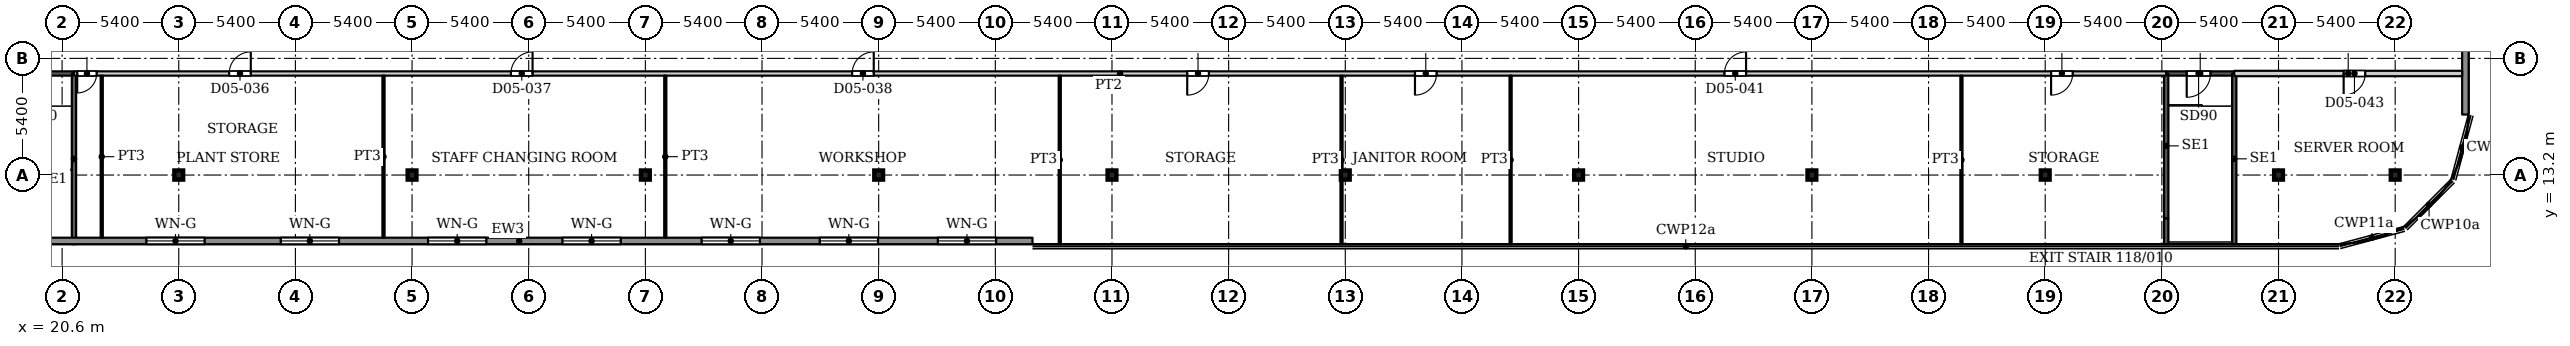
"""IFC4 building model, lengths in metres.
Left out: names, types, materials, properties, quantities, classifications, styles, units other than length and angle.
Written with IfcOpenShell. Run it as: python <this file> out.ifc"""

import sys

from ifc_helpers import new_model, si_unit, direction, frame, frame_2d, origin, origin_2d, place, context, subcontext, project, spatial, rectangle, i_section, extrude, source, transform, mapped, element, fill, save


model = new_model("IFC4")
c1 = context("Model", 3, precision=1e-05, world=origin(), true_north=direction((0.0, 1.0)))
c2 = subcontext(c1, "Body", "Model", "MODEL_VIEW")
j1 = project(units=[si_unit("LENGTHUNIT", "METRE"), si_unit("PLANEANGLEUNIT", "RADIAN")], contexts=[c1])
p1 = place(None, origin())
s1 = spatial("IfcSite", under=j1, at=p1, CompositionType="ELEMENT")
p2 = place(p1, origin())
s2 = spatial("IfcBuilding", under=s1, at=p2, CompositionType="ELEMENT")
p3 = place(p2, frame((0.0, 0.0, 26.0)))
s3 = spatial("IfcBuildingStorey", under=s2, at=p3, CompositionType="ELEMENT", Elevation=26.0)
for number, where, z_axis, x_axis in (
    (1, (26.0, 13.2, 0.0), (0.0, 0.0, 1.0), (1.0, 0.0, 0.0)),
    (2, (36.8, 13.2, 0.0), (0.0, 0.0, 1.0), (1.0, 0.0, 0.0)),
    (3, (47.6, 13.2, 0.0), (0.0, 0.0, 1.0), (1.0, 0.0, 0.0)),
    (4, (58.4, 13.2, 0.0), (0.0, 0.0, 1.0), (1.0, 0.0, 0.0)),
    (5, (69.2, 13.2, 0.0), (0.0, 0.0, 1.0), (1.0, 0.0, 0.0)),
    (6, (80.0, 13.2, 0.0), (0.0, 0.0, 1.0), (1.0, 0.0, 0.0)),
    (7, (90.8, 13.2, 0.0), (0.0, 0.0, 1.0), (1.0, 0.0, 0.0)),
    (8, (101.6, 13.2, 0.0), (0.0, 0.0, 1.0), (1.0, 0.0, 0.0)),
    (9, (112.4, 13.2, 0.0), (0.0, 0.0, 1.0), (1.0, 0.0, 0.0)),
    (10, (123.2, 13.2, 0.0), (0.0, 0.0, 1.0), (1.0, 0.0, 0.0)),
    (11, (128.6, 13.2, 0.0), (0.0, 0.0, 1.0), (1.0, 0.0, 0.0)),
):
    element("IfcColumn", number, at=place(p3, frame(where, z_axis=z_axis, x_axis=x_axis)), inside=s3, PredefinedType="COLUMN", context=c2, shape_type="SweptSolid", body=[
        extrude(i_section(OverallWidth=0.409, OverallDepth=0.425, WebThickness=0.033, FlangeThickness=0.052, FilletRadius=0.013, at=origin_2d()), origin(), (0.0, 0.0, 1.0), 4.5),
    ])
p4 = place(p3, frame((131.85, 54.72, 0.0), z_axis=(0.0, 0.0, 1.0), x_axis=(0.0, -1.0, 0.0)))
e12 = element("IfcWall", 12, at=p4, inside=s3, PredefinedType="SOLIDWALL", context=c2, shape_type="SweptSolid", body=[
    extrude(rectangle(XDim=38.72, YDim=0.3, at=frame_2d((19.36, 0.0))), origin(), (0.0, 0.0, 1.0), 4.25),
])
p5 = place(p4, frame((2.435, 0.0, 2.4)))
e13 = element("IfcOpeningElement", 13, at=p5, cuts=e12, PredefinedType="OPENING", context=c2, shape_type="SweptSolid", body=[
    extrude(rectangle(XDim=2.7, YDim=1.2, at=frame_2d((1.35, 0.6))), frame((0.0, 0.16, 0.0), z_axis=(0.0, -1.0, 0.0), x_axis=(1.0, 0.0, 0.0)), (0.0, 0.0, 1.0), 0.32),
])
p6 = place(p4, frame((13.58, 0.0, 2.4)))
e14 = element("IfcOpeningElement", 14, at=p6, cuts=e12, PredefinedType="OPENING", context=c2, shape_type="SweptSolid", body=[
    extrude(rectangle(XDim=2.7, YDim=1.2, at=frame_2d((1.35, 0.6))), frame((0.0, 0.16, 0.0), z_axis=(0.0, -1.0, 0.0), x_axis=(1.0, 0.0, 0.0)), (0.0, 0.0, 1.0), 0.32),
])
p7 = place(p4, frame((26.16, 0.0, 2.4)))
e15 = element("IfcOpeningElement", 15, at=p7, cuts=e12, PredefinedType="OPENING", context=c2, shape_type="SweptSolid", body=[
    extrude(rectangle(XDim=2.7, YDim=1.2, at=frame_2d((1.35, 0.6))), frame((0.0, 0.16, 0.0), z_axis=(0.0, -1.0, 0.0), x_axis=(1.0, 0.0, 0.0)), (0.0, 0.0, 1.0), 0.32),
])
p8 = place(p3, frame((65.52, 10.15, 0.0), z_axis=(0.0, 0.0, 1.0), x_axis=(-1.0, 0.0, 0.0)))
e16 = element("IfcWall", 16, at=p8, inside=s3, PredefinedType="SOLIDWALL", context=c2, shape_type="SweptSolid", body=[
    extrude(rectangle(XDim=47.52, YDim=0.3, at=frame_2d((23.76, 0.0))), origin(), (0.0, 0.0, 1.0), 4.25),
])
p9 = place(p8, frame((1.683, 0.0, 2.4)))
e17 = element("IfcOpeningElement", 17, at=p9, cuts=e16, PredefinedType="OPENING", context=c2, shape_type="SweptSolid", body=[
    extrude(rectangle(XDim=2.7, YDim=1.2, at=frame_2d((1.35, 0.6))), frame((0.0, 0.16, 0.0), z_axis=(0.0, -1.0, 0.0), x_axis=(1.0, 0.0, 0.0)), (0.0, 0.0, 1.0), 0.32),
])
p10 = place(p8, frame((7.15, 0.0, 2.4)))
e18 = element("IfcOpeningElement", 18, at=p10, cuts=e16, PredefinedType="OPENING", context=c2, shape_type="SweptSolid", body=[
    extrude(rectangle(XDim=2.7, YDim=1.2, at=frame_2d((1.35, 0.6))), frame((0.0, 0.16, 0.0), z_axis=(0.0, -1.0, 0.0), x_axis=(1.0, 0.0, 0.0)), (0.0, 0.0, 1.0), 0.32),
])
p11 = place(p8, frame((12.617, 0.0, 2.4)))
e19 = element("IfcOpeningElement", 19, at=p11, cuts=e16, PredefinedType="OPENING", context=c2, shape_type="SweptSolid", body=[
    extrude(rectangle(XDim=2.7, YDim=1.2, at=frame_2d((1.35, 0.6))), frame((0.0, 0.16, 0.0), z_axis=(0.0, -1.0, 0.0), x_axis=(1.0, 0.0, 0.0)), (0.0, 0.0, 1.0), 0.32),
])
p12 = place(p8, frame((19.06, 0.0, 2.4)))
e20 = element("IfcOpeningElement", 20, at=p12, cuts=e16, PredefinedType="OPENING", context=c2, shape_type="SweptSolid", body=[
    extrude(rectangle(XDim=2.7, YDim=1.2, at=frame_2d((1.35, 0.6))), frame((0.0, 0.16, 0.0), z_axis=(0.0, -1.0, 0.0), x_axis=(1.0, 0.0, 0.0)), (0.0, 0.0, 1.0), 0.32),
])
p13 = place(p8, frame((25.28, 0.0, 2.4)))
e21 = element("IfcOpeningElement", 21, at=p13, cuts=e16, PredefinedType="OPENING", context=c2, shape_type="SweptSolid", body=[
    extrude(rectangle(XDim=2.7, YDim=1.2, at=frame_2d((1.35, 0.6))), frame((0.0, 0.16, 0.0), z_axis=(0.0, -1.0, 0.0), x_axis=(1.0, 0.0, 0.0)), (0.0, 0.0, 1.0), 0.32),
])
p14 = place(p8, frame((32.1, 0.0, 2.4)))
e22 = element("IfcOpeningElement", 22, at=p14, cuts=e16, PredefinedType="OPENING", context=c2, shape_type="SweptSolid", body=[
    extrude(rectangle(XDim=2.7, YDim=1.2, at=frame_2d((1.35, 0.6))), frame((0.0, 0.16, 0.0), z_axis=(0.0, -1.0, 0.0), x_axis=(1.0, 0.0, 0.0)), (0.0, 0.0, 1.0), 0.32),
])
p15 = place(p8, frame((38.32, 0.0, 2.4)))
e23 = element("IfcOpeningElement", 23, at=p15, cuts=e16, PredefinedType="OPENING", context=c2, shape_type="SweptSolid", body=[
    extrude(rectangle(XDim=2.7, YDim=1.2, at=frame_2d((1.35, 0.6))), frame((0.0, 0.16, 0.0), z_axis=(0.0, -1.0, 0.0), x_axis=(1.0, 0.0, 0.0)), (0.0, 0.0, 1.0), 0.32),
])
p16 = place(p3, frame((18.0, 17.9, 0.0), z_axis=(0.0, 0.0, 1.0), x_axis=(1.0, 0.0, 0.0)))
e24 = element("IfcWall", 24, at=p16, inside=s3, PredefinedType="SHEAR", context=c2, shape_type="SweptSolid", body=[
    extrude(rectangle(XDim=3.15, YDim=0.2, at=frame_2d((1.575, 0.0))), origin(), (0.0, 0.0, 1.0), 4.5),
])
p17 = place(p16, frame((0.95, 0.0, 0.0)))
e25 = element("IfcOpeningElement", 25, at=p17, cuts=e24, PredefinedType="OPENING", context=c2, shape_type="SweptSolid", body=[
    extrude(rectangle(XDim=1.1, YDim=2.2, at=frame_2d((0.55, 1.1))), frame((0.0, 0.11, 0.0), z_axis=(0.0, -1.0, 0.0), x_axis=(1.0, 0.0, 0.0)), (0.0, 0.0, 1.0), 0.22),
])
p18 = place(p3, frame((21.15, 10.0, 0.0), z_axis=(0.0, 0.0, 1.0), x_axis=(0.0, 1.0, 0.0)))
e26 = element("IfcWall", 26, at=p18, inside=s3, PredefinedType="SHEAR", context=c2, shape_type="SweptSolid", body=[
    extrude(rectangle(XDim=7.9, YDim=0.2, at=frame_2d((3.95, 0.0))), origin(), (0.0, 0.0, 1.0), 4.5),
])
p19 = place(p3, frame((118.0, 17.9, 0.0), z_axis=(0.0, 0.0, 1.0), x_axis=(1.0, 0.0, 0.0)))
e27 = element("IfcWall", 27, at=p19, inside=s3, PredefinedType="SHEAR", context=c2, shape_type="SweptSolid", body=[
    extrude(rectangle(XDim=3.15, YDim=0.2, at=frame_2d((1.575, 0.0))), origin(), (0.0, 0.0, 1.0), 4.5),
])
p20 = place(p19, frame((0.95, 0.0, 0.0)))
e28 = element("IfcOpeningElement", 28, at=p20, cuts=e27, PredefinedType="OPENING", context=c2, shape_type="SweptSolid", body=[
    extrude(rectangle(XDim=1.1, YDim=2.2, at=frame_2d((0.55, 1.1))), frame((0.0, 0.11, 0.0), z_axis=(0.0, -1.0, 0.0), x_axis=(1.0, 0.0, 0.0)), (0.0, 0.0, 1.0), 0.22),
])
p21 = place(p3, frame((118.0, 10.0, 0.0), z_axis=(0.0, 0.0, 1.0), x_axis=(0.0, 1.0, 0.0)))
e29 = element("IfcWall", 29, at=p21, inside=s3, PredefinedType="SHEAR", context=c2, shape_type="SweptSolid", body=[
    extrude(rectangle(XDim=1.2, YDim=0.2, at=frame_2d((0.6, 0.0))), origin(), (0.0, 0.0, 1.0), 4.5),
])
p22 = place(p3, frame((118.0, 11.2, 0.0), z_axis=(0.0, 0.0, 1.0), x_axis=(0.0, 1.0, 0.0)))
e30 = element("IfcWall", 30, at=p22, inside=s3, PredefinedType="SHEAR", context=c2, shape_type="SweptSolid", body=[
    extrude(rectangle(XDim=6.7, YDim=0.2, at=frame_2d((3.35, 0.0))), origin(), (0.0, 0.0, 1.0), 4.5),
])
p23 = place(p3, frame((121.15, 10.0, 0.0), z_axis=(0.0, 0.0, 1.0), x_axis=(0.0, 1.0, 0.0)))
e31 = element("IfcWall", 31, at=p23, inside=s3, PredefinedType="SHEAR", context=c2, shape_type="SweptSolid", body=[
    extrude(rectangle(XDim=7.9, YDim=0.2, at=frame_2d((3.95, 0.0))), origin(), (0.0, 0.0, 1.0), 4.5),
])
p24 = place(p3, frame((21.15, 17.9, 0.0), z_axis=(0.0, 0.0, 1.0), x_axis=(1.0, 0.0, 0.0)))
e32 = element("IfcWall", 32, at=p24, inside=s3, PredefinedType="PARTITIONING", context=c2, shape_type="SweptSolid", body=[
    extrude(rectangle(XDim=96.85, YDim=0.2, at=frame_2d((48.425, 0.0))), origin(), (0.0, 0.0, 1.0), 4.2),
])
p25 = place(p24, frame((0.15, 0.0, 0.0)))
e33 = element("IfcOpeningElement", 33, at=p25, cuts=e32, PredefinedType="OPENING", context=c2, shape_type="SweptSolid", body=[
    extrude(rectangle(XDim=0.9, YDim=2.1, at=frame_2d((0.45, 1.05))), frame((0.0, 0.11, 0.0), z_axis=(0.0, -1.0, 0.0), x_axis=(1.0, 0.0, 0.0)), (0.0, 0.0, 1.0), 0.22),
])
p26 = place(p24, frame((7.185, 0.0, 0.0)))
e34 = element("IfcOpeningElement", 34, at=p26, cuts=e32, PredefinedType="OPENING", context=c2, shape_type="SweptSolid", body=[
    extrude(rectangle(XDim=1.0, YDim=2.1, at=frame_2d((0.5, 1.05))), frame((0.0, 0.11, 0.0), z_axis=(0.0, -1.0, 0.0), x_axis=(1.0, 0.0, 0.0)), (0.0, 0.0, 1.0), 0.22),
])
p27 = place(p24, frame((20.228, 0.0, 0.0)))
e35 = element("IfcOpeningElement", 35, at=p27, cuts=e32, PredefinedType="OPENING", context=c2, shape_type="SweptSolid", body=[
    extrude(rectangle(XDim=1.0, YDim=2.1, at=frame_2d((0.5, 1.05))), frame((0.0, 0.11, 0.0), z_axis=(0.0, -1.0, 0.0), x_axis=(1.0, 0.0, 0.0)), (0.0, 0.0, 1.0), 0.22),
])
p28 = place(p24, frame((36.022, 0.0, 0.0)))
e36 = element("IfcOpeningElement", 36, at=p28, cuts=e32, PredefinedType="OPENING", context=c2, shape_type="SweptSolid", body=[
    extrude(rectangle(XDim=1.0, YDim=2.1, at=frame_2d((0.5, 1.05))), frame((0.0, 0.11, 0.0), z_axis=(0.0, -1.0, 0.0), x_axis=(1.0, 0.0, 0.0)), (0.0, 0.0, 1.0), 0.22),
])
p29 = place(p24, frame((51.533, 0.0, 0.0)))
e37 = element("IfcOpeningElement", 37, at=p29, cuts=e32, PredefinedType="OPENING", context=c2, shape_type="SweptSolid", body=[
    extrude(rectangle(XDim=1.0, YDim=2.1, at=frame_2d((0.5, 1.05))), frame((0.0, 0.11, 0.0), z_axis=(0.0, -1.0, 0.0), x_axis=(1.0, 0.0, 0.0)), (0.0, 0.0, 1.0), 0.22),
])
p30 = place(p24, frame((62.076, 0.0, 0.0)))
e38 = element("IfcOpeningElement", 38, at=p30, cuts=e32, PredefinedType="OPENING", context=c2, shape_type="SweptSolid", body=[
    extrude(rectangle(XDim=1.0, YDim=2.1, at=frame_2d((0.5, 1.05))), frame((0.0, 0.11, 0.0), z_axis=(0.0, -1.0, 0.0), x_axis=(1.0, 0.0, 0.0)), (0.0, 0.0, 1.0), 0.22),
])
p31 = place(p24, frame((76.402, 0.0, 0.0)))
e39 = element("IfcOpeningElement", 39, at=p31, cuts=e32, PredefinedType="OPENING", context=c2, shape_type="SweptSolid", body=[
    extrude(rectangle(XDim=1.0, YDim=2.1, at=frame_2d((0.5, 1.05))), frame((0.0, 0.11, 0.0), z_axis=(0.0, -1.0, 0.0), x_axis=(1.0, 0.0, 0.0)), (0.0, 0.0, 1.0), 0.22),
])
p32 = place(p24, frame((91.522, 0.0, 0.0)))
e40 = element("IfcOpeningElement", 40, at=p32, cuts=e32, PredefinedType="OPENING", context=c2, shape_type="SweptSolid", body=[
    extrude(rectangle(XDim=1.0, YDim=2.1, at=frame_2d((0.5, 1.05))), frame((0.0, 0.11, 0.0), z_axis=(0.0, -1.0, 0.0), x_axis=(1.0, 0.0, 0.0)), (0.0, 0.0, 1.0), 0.22),
])
for number, where, z_axis, x_axis in (
    (41, (22.435, 10.299, 0.0), (0.0, 0.0, 1.0), (0.0, 1.0, 0.0)),
    (42, (35.478, 10.299, 0.0), (0.0, 0.0, 1.0), (0.0, 1.0, 0.0)),
    (43, (48.522, 10.299, 0.0), (0.0, 0.0, 1.0), (0.0, 1.0, 0.0)),
):
    element("IfcWall", number, at=place(p3, frame(where, z_axis=z_axis, x_axis=x_axis)), inside=s3, PredefinedType="PARTITIONING", context=c2, shape_type="SweptSolid", body=[
        extrude(rectangle(XDim=7.501, YDim=0.1, at=frame_2d((3.75, 0.0))), origin(), (0.0, 0.0, 1.0), 4.2),
    ])
for number, where, z_axis, x_axis in (
    (44, (66.783, 10.0, 0.0), (0.0, 0.0, 1.0), (0.0, 1.0, 0.0)),
    (45, (79.826, 10.0, 0.0), (0.0, 0.0, 1.0), (0.0, 1.0, 0.0)),
    (46, (87.652, 10.0, 0.0), (0.0, 0.0, 1.0), (0.0, 1.0, 0.0)),
    (47, (108.522, 10.0, 0.0), (0.0, 0.0, 1.0), (0.0, 1.0, 0.0)),
):
    element("IfcWall", number, at=place(p3, frame(where, z_axis=z_axis, x_axis=x_axis)), inside=s3, PredefinedType="PARTITIONING", context=c2, shape_type="SweptSolid", body=[
        extrude(rectangle(XDim=7.8, YDim=0.1, at=frame_2d((3.9, 0.0))), origin(), (0.0, 0.0, 1.0), 4.2),
    ])
p33 = place(p3, frame((121.15, 17.9, 0.0), z_axis=(0.0, 0.0, 1.0), x_axis=(1.0, 0.0, 0.0)))
e48 = element("IfcWall", 48, at=p33, inside=s3, PredefinedType="PARTITIONING", context=c2, shape_type="SweptSolid", body=[
    extrude(rectangle(XDim=10.551, YDim=0.25, at=frame_2d((5.275, 0.0))), origin(), (0.0, 0.0, 1.0), 4.2),
])
p34 = place(p33, frame((5.065, 0.0, 0.0)))
e49 = element("IfcOpeningElement", 49, at=p34, cuts=e48, PredefinedType="OPENING", context=c2, shape_type="SweptSolid", body=[
    extrude(rectangle(XDim=1.0, YDim=2.1, at=frame_2d((0.5, 1.05))), frame((0.0, 0.135, 0.0), z_axis=(0.0, -1.0, 0.0), x_axis=(1.0, 0.0, 0.0)), (0.0, 0.0, 1.0), 0.27),
])
m1 = source(origin(), c2, "Body", "SweptSolid", [
    extrude(rectangle(XDim=2.7, YDim=1.2, at=frame_2d((1.35, 0.6))), frame((0.0, 0.03, 0.0), z_axis=(0.0, -1.0, 0.0), x_axis=(1.0, 0.0, 0.0)), (0.0, 0.0, 1.0), 0.06),
])
p35 = place(p9, origin())
e50 = element("IfcWindow", 50, at=p35, inside=s3, PartitioningType="SINGLE_PANEL", PredefinedType="WINDOW", context=c2, shape_type="MappedRepresentation", body=[
    mapped(m1, transform((0.0, 0.0, 0.0), x_axis=(1.0, 0.0, 0.0), y_axis=(0.0, 1.0, 0.0), z_axis=(0.0, 0.0, 1.0), scale=1.0)),
])
fill(e17, e50)
p36 = place(p10, origin())
e51 = element("IfcWindow", 51, at=p36, inside=s3, PartitioningType="SINGLE_PANEL", PredefinedType="WINDOW", context=c2, shape_type="MappedRepresentation", body=[
    mapped(m1, transform((0.0, 0.0, 0.0), x_axis=(1.0, 0.0, 0.0), y_axis=(0.0, 1.0, 0.0), z_axis=(0.0, 0.0, 1.0), scale=1.0)),
])
fill(e18, e51)
p37 = place(p11, origin())
e52 = element("IfcWindow", 52, at=p37, inside=s3, PartitioningType="SINGLE_PANEL", PredefinedType="WINDOW", context=c2, shape_type="MappedRepresentation", body=[
    mapped(m1, transform((0.0, 0.0, 0.0), x_axis=(1.0, 0.0, 0.0), y_axis=(0.0, 1.0, 0.0), z_axis=(0.0, 0.0, 1.0), scale=1.0)),
])
fill(e19, e52)
p38 = place(p12, origin())
e53 = element("IfcWindow", 53, at=p38, inside=s3, PartitioningType="SINGLE_PANEL", PredefinedType="WINDOW", context=c2, shape_type="MappedRepresentation", body=[
    mapped(m1, transform((0.0, 0.0, 0.0), x_axis=(1.0, 0.0, 0.0), y_axis=(0.0, 1.0, 0.0), z_axis=(0.0, 0.0, 1.0), scale=1.0)),
])
fill(e20, e53)
p39 = place(p13, origin())
e54 = element("IfcWindow", 54, at=p39, inside=s3, PartitioningType="SINGLE_PANEL", PredefinedType="WINDOW", context=c2, shape_type="MappedRepresentation", body=[
    mapped(m1, transform((0.0, 0.0, 0.0), x_axis=(1.0, 0.0, 0.0), y_axis=(0.0, 1.0, 0.0), z_axis=(0.0, 0.0, 1.0), scale=1.0)),
])
fill(e21, e54)
p40 = place(p14, origin())
e55 = element("IfcWindow", 55, at=p40, inside=s3, PartitioningType="SINGLE_PANEL", PredefinedType="WINDOW", context=c2, shape_type="MappedRepresentation", body=[
    mapped(m1, transform((0.0, 0.0, 0.0), x_axis=(1.0, 0.0, 0.0), y_axis=(0.0, 1.0, 0.0), z_axis=(0.0, 0.0, 1.0), scale=1.0)),
])
fill(e22, e55)
p41 = place(p15, origin())
e56 = element("IfcWindow", 56, at=p41, inside=s3, PartitioningType="SINGLE_PANEL", PredefinedType="WINDOW", context=c2, shape_type="MappedRepresentation", body=[
    mapped(m1, transform((0.0, 0.0, 0.0), x_axis=(1.0, 0.0, 0.0), y_axis=(0.0, 1.0, 0.0), z_axis=(0.0, 0.0, 1.0), scale=1.0)),
])
fill(e23, e56)
m2 = source(origin(), c2, "Body", "SweptSolid", [
    extrude(rectangle(XDim=1.1, YDim=2.2, at=frame_2d((0.55, 1.1))), frame((0.0, 0.025, 0.0), z_axis=(0.0, -1.0, 0.0), x_axis=(1.0, 0.0, 0.0)), (0.0, 0.0, 1.0), 0.05),
])
p42 = place(p20, origin())
e57 = element("IfcDoor", 57, at=p42, inside=s3, OperationType="SINGLE_SWING_RIGHT", PredefinedType="DOOR", context=c2, shape_type="MappedRepresentation", body=[
    mapped(m2, transform((0.0, 0.0, 0.0), x_axis=(1.0, 0.0, 0.0), y_axis=(0.0, 1.0, 0.0), z_axis=(0.0, 0.0, 1.0), scale=1.0)),
])
fill(e28, e57)
m3 = source(origin(), c2, "Body", "SweptSolid", [
    extrude(rectangle(XDim=0.9, YDim=2.1, at=frame_2d((0.45, 1.05))), frame((0.0, 0.025, 0.0), z_axis=(0.0, -1.0, 0.0), x_axis=(1.0, 0.0, 0.0)), (0.0, 0.0, 1.0), 0.05),
])
p43 = place(p25, origin())
e58 = element("IfcDoor", 58, at=p43, inside=s3, OperationType="SINGLE_SWING_RIGHT", PredefinedType="DOOR", context=c2, shape_type="MappedRepresentation", body=[
    mapped(m3, transform((0.0, 0.0, 0.0), x_axis=(1.0, 0.0, 0.0), y_axis=(0.0, 1.0, 0.0), z_axis=(0.0, 0.0, 1.0), scale=1.0)),
])
fill(e33, e58)
m4 = source(origin(), c2, "Body", "SweptSolid", [
    extrude(rectangle(XDim=1.0, YDim=2.1, at=frame_2d((0.5, 1.05))), frame((0.0, 0.025, 0.0), z_axis=(0.0, -1.0, 0.0), x_axis=(1.0, 0.0, 0.0)), (0.0, 0.0, 1.0), 0.05),
])
p44 = place(p26, origin())
e59 = element("IfcDoor", 59, at=p44, inside=s3, OperationType="SINGLE_SWING_LEFT", PredefinedType="DOOR", context=c2, shape_type="MappedRepresentation", body=[
    mapped(m4, transform((0.0, 0.0, 0.0), x_axis=(1.0, 0.0, 0.0), y_axis=(0.0, 1.0, 0.0), z_axis=(0.0, 0.0, 1.0), scale=1.0)),
])
fill(e34, e59)
p45 = place(p27, origin())
e60 = element("IfcDoor", 60, at=p45, inside=s3, OperationType="SINGLE_SWING_LEFT", PredefinedType="DOOR", context=c2, shape_type="MappedRepresentation", body=[
    mapped(m4, transform((0.0, 0.0, 0.0), x_axis=(1.0, 0.0, 0.0), y_axis=(0.0, 1.0, 0.0), z_axis=(0.0, 0.0, 1.0), scale=1.0)),
])
fill(e35, e60)
p46 = place(p28, origin())
e61 = element("IfcDoor", 61, at=p46, inside=s3, OperationType="SINGLE_SWING_LEFT", PredefinedType="DOOR", context=c2, shape_type="MappedRepresentation", body=[
    mapped(m4, transform((0.0, 0.0, 0.0), x_axis=(1.0, 0.0, 0.0), y_axis=(0.0, 1.0, 0.0), z_axis=(0.0, 0.0, 1.0), scale=1.0)),
])
fill(e36, e61)
p47 = place(p29, origin())
e62 = element("IfcDoor", 62, at=p47, inside=s3, OperationType="SINGLE_SWING_RIGHT", PredefinedType="DOOR", context=c2, shape_type="MappedRepresentation", body=[
    mapped(m4, transform((0.0, 0.0, 0.0), x_axis=(1.0, 0.0, 0.0), y_axis=(0.0, 1.0, 0.0), z_axis=(0.0, 0.0, 1.0), scale=1.0)),
])
fill(e37, e62)
p48 = place(p30, origin())
e63 = element("IfcDoor", 63, at=p48, inside=s3, OperationType="SINGLE_SWING_RIGHT", PredefinedType="DOOR", context=c2, shape_type="MappedRepresentation", body=[
    mapped(m4, transform((0.0, 0.0, 0.0), x_axis=(1.0, 0.0, 0.0), y_axis=(0.0, 1.0, 0.0), z_axis=(0.0, 0.0, 1.0), scale=1.0)),
])
fill(e38, e63)
p49 = place(p31, origin())
e64 = element("IfcDoor", 64, at=p49, inside=s3, OperationType="SINGLE_SWING_LEFT", PredefinedType="DOOR", context=c2, shape_type="MappedRepresentation", body=[
    mapped(m4, transform((0.0, 0.0, 0.0), x_axis=(1.0, 0.0, 0.0), y_axis=(0.0, 1.0, 0.0), z_axis=(0.0, 0.0, 1.0), scale=1.0)),
])
fill(e39, e64)
p50 = place(p32, origin())
e65 = element("IfcDoor", 65, at=p50, inside=s3, OperationType="SINGLE_SWING_RIGHT", PredefinedType="DOOR", context=c2, shape_type="MappedRepresentation", body=[
    mapped(m4, transform((0.0, 0.0, 0.0), x_axis=(1.0, 0.0, 0.0), y_axis=(0.0, 1.0, 0.0), z_axis=(0.0, 0.0, 1.0), scale=1.0)),
])
fill(e40, e65)
m5 = source(origin(), c2, "Body", "SweptSolid", [
    extrude(rectangle(XDim=1.0, YDim=2.1, at=frame_2d((0.5, 1.05))), frame((0.0, 0.025, 0.0), z_axis=(0.0, -1.0, 0.0), x_axis=(1.0, 0.0, 0.0)), (0.0, 0.0, 1.0), 0.05),
])
p51 = place(p34, origin())
e66 = element("IfcDoor", 66, at=p51, inside=s3, OperationType="SINGLE_SWING_RIGHT", PredefinedType="DOOR", context=c2, shape_type="MappedRepresentation", body=[
    mapped(m5, transform((0.0, 0.0, 0.0), x_axis=(1.0, 0.0, 0.0), y_axis=(0.0, 1.0, 0.0), z_axis=(0.0, 0.0, 1.0), scale=1.0)),
])
fill(e49, e66)
save(model, sys.argv[1])
